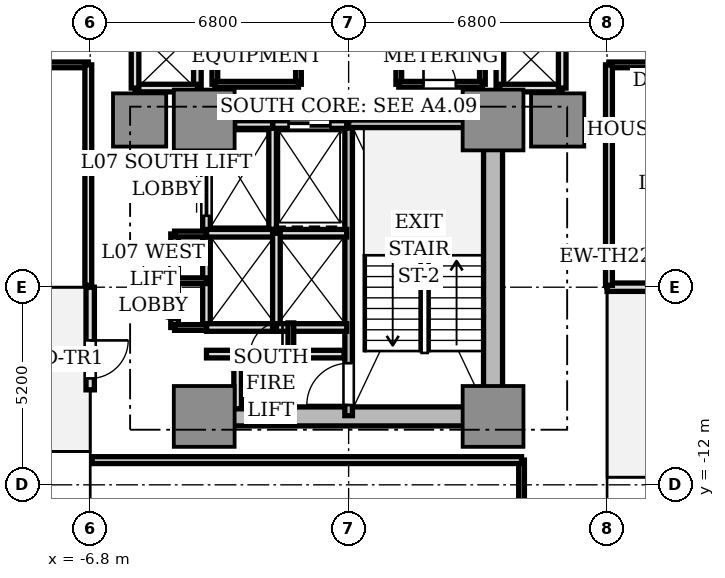
"""IFC4 building model, lengths in metres.
Left out: names, types, materials, properties, quantities, classifications, styles, units other than length and angle.
Written with IfcOpenShell. Run it as: python <this file> out.ifc"""

import sys

from ifc_helpers import new_model, si_unit, direction, frame, frame_2d, origin, origin_2d, place, context, subcontext, project, spatial, rectangle, extrude, source, transform, mapped, element, fill, save


model = new_model("IFC4")
c1 = context("Model", 3, precision=1e-05, world=origin(), true_north=direction((0.0, 1.0)))
c2 = subcontext(c1, "Body", "Model", "MODEL_VIEW")
j1 = project(units=[si_unit("LENGTHUNIT", "METRE"), si_unit("PLANEANGLEUNIT", "RADIAN")], contexts=[c1])
p1 = place(None, origin())
s1 = spatial("IfcSite", under=j1, at=p1, CompositionType="ELEMENT")
p2 = place(p1, origin())
s2 = spatial("IfcBuilding", under=s1, at=p2, CompositionType="ELEMENT")
p3 = place(p2, frame((0.0, 0.0, 29.8)))
s3 = spatial("IfcBuildingStorey", under=s2, at=p3, CompositionType="ELEMENT", Elevation=29.8)
p4 = place(p3, frame((-3.55, -10.2, 0.0), z_axis=(0.0, 0.0, 1.0), x_axis=(1.0, 0.0, 0.0)))
e1 = element("IfcWall", 1, at=p4, inside=s3, PredefinedType="SHEAR", context=c2, shape_type="SweptSolid", body=[
    extrude(rectangle(XDim=7.1, YDim=0.5, at=frame_2d((3.55, 0.0))), origin(), (0.0, 0.0, 1.0), 3.11),
])
p5 = place(p3, frame((3.8, -9.75, 0.0), z_axis=(0.0, 0.0, 1.0), x_axis=(0.0, 1.0, 0.0)))
e2 = element("IfcWall", 2, at=p5, inside=s3, PredefinedType="SHEAR", context=c2, shape_type="SweptSolid", body=[
    extrude(rectangle(XDim=6.9, YDim=0.5, at=frame_2d((3.45, 0.0))), origin(), (0.0, 0.0, 1.0), 3.11),
])
m1 = source(origin(), c2, "Body", "SweptSolid", [
    extrude(rectangle(XDim=1.6, YDim=1.6, at=origin_2d()), origin(), (0.0, 0.0, 1.0), 3.11),
])
for number, where, z_axis, x_axis in (
    (3, (-3.8, -2.4, 0.0), (0.0, 0.0, 1.0), (1.0, 0.0, 0.0)),
    (4, (3.8, -2.4, 0.0), (0.0, 0.0, 1.0), (1.0, 0.0, 0.0)),
    (5, (-3.8, -10.2, 0.0), (0.0, 0.0, 1.0), (1.0, 0.0, 0.0)),
    (6, (3.8, -10.2, 0.0), (0.0, 0.0, 1.0), (1.0, 0.0, 0.0)),
):
    element("IfcColumn", number, at=place(p3, frame(where, z_axis=z_axis, x_axis=x_axis)), inside=s3, PredefinedType="COLUMN", context=c2, shape_type="MappedRepresentation", body=[
        mapped(m1, transform((0.0, 0.0, 0.0), scale=1.0)),
    ])
m2 = source(origin(), c2, "Body", "SweptSolid", [
    extrude(rectangle(XDim=1.4, YDim=1.4, at=origin_2d()), origin(), (0.0, 0.0, 1.0), 3.11),
])
for number, where, z_axis, x_axis in (
    (7, (5.5, -2.4, 0.0), (0.0, 0.0, 1.0), (1.0, 0.0, 0.0)),
    (8, (-5.5, -2.4, 0.0), (0.0, 0.0, 1.0), (1.0, 0.0, 0.0)),
):
    element("IfcColumn", number, at=place(p3, frame(where, z_axis=z_axis, x_axis=x_axis)), inside=s3, PredefinedType="COLUMN", context=c2, shape_type="MappedRepresentation", body=[
        mapped(m2, transform((0.0, 0.0, 0.0), scale=1.0)),
    ])
p6 = place(p3, frame((6.8, -6.8, 0.0), z_axis=(0.0, 0.0, 1.0), x_axis=(1.0, 0.0, 0.0)))
e9 = element("IfcWall", 9, at=p6, inside=s3, PredefinedType="STANDARD", context=c2, shape_type="SweptSolid", body=[
    extrude(rectangle(XDim=2.7, YDim=0.22, at=frame_2d((1.35, 0.0))), origin(), (0.0, 0.0, 1.0), 3.11),
])
p7 = place(p6, frame((1.4, 0.0, 0.0)))
e10 = element("IfcOpeningElement", 10, at=p7, cuts=e9, PredefinedType="OPENING", context=c2, shape_type="SweptSolid", body=[
    extrude(rectangle(XDim=1.0, YDim=2.2, at=frame_2d((0.5, 1.1))), frame((0.0, 0.12, 0.0), z_axis=(0.0, -1.0, 0.0), x_axis=(1.0, 0.0, 0.0)), (0.0, 0.0, 1.0), 0.24),
])
p8 = place(p3, frame((-6.8, -6.8, 0.0), z_axis=(0.0, 0.0, 1.0), x_axis=(0.0, -1.0, 0.0)))
e11 = element("IfcWall", 11, at=p8, inside=s3, PredefinedType="STANDARD", context=c2, shape_type="SweptSolid", body=[
    extrude(rectangle(XDim=2.7, YDim=0.22, at=frame_2d((1.35, 0.0))), origin(), (0.0, 0.0, 1.0), 3.11),
])
p9 = place(p8, frame((1.4, 0.0, 0.0)))
e12 = element("IfcOpeningElement", 12, at=p9, cuts=e11, PredefinedType="OPENING", context=c2, shape_type="SweptSolid", body=[
    extrude(rectangle(XDim=1.0, YDim=2.2, at=frame_2d((0.5, 1.1))), frame((0.0, 0.12, 0.0), z_axis=(0.0, -1.0, 0.0), x_axis=(1.0, 0.0, 0.0)), (0.0, 0.0, 1.0), 0.24),
])
p10 = place(p3, frame((0.0, -10.18, 0.0), z_axis=(0.0, 0.0, 1.0), x_axis=(0.0, 1.0, 0.0)))
e13 = element("IfcWall", 13, at=p10, inside=s3, PredefinedType="SOLIDWALL", context=c2, shape_type="SweptSolid", body=[
    extrude(rectangle(XDim=7.68, YDim=0.2, at=frame_2d((3.84, 0.0))), origin(), (0.0, 0.0, 1.0), 3.11),
])
p11 = place(p10, frame((0.28, 0.0, 0.0)))
e14 = element("IfcOpeningElement", 14, at=p11, cuts=e13, PredefinedType="OPENING", context=c2, shape_type="SweptSolid", body=[
    extrude(rectangle(XDim=1.1, YDim=2.15, at=frame_2d((0.55, 1.075))), frame((0.0, 0.11, 0.0), z_axis=(0.0, -1.0, 0.0), x_axis=(1.0, 0.0, 0.0)), (0.0, 0.0, 1.0), 0.22),
])
p12 = place(p3, frame((0.0, -2.5, 0.0), z_axis=(0.0, 0.0, 1.0), x_axis=(1.0, 0.0, 0.0)))
e15 = element("IfcWall", 15, at=p12, inside=s3, PredefinedType="SOLIDWALL", context=c2, shape_type="SweptSolid", body=[
    extrude(rectangle(XDim=3.72, YDim=0.2, at=frame_2d((1.86, 0.0))), origin(), (0.0, 0.0, 1.0), 3.11),
])
p13 = place(p3, frame((-2.0, -5.28, 0.0), z_axis=(0.0, 0.0, 1.0), x_axis=(0.0, 1.0, 0.0)))
e16 = element("IfcWall", 16, at=p13, inside=s3, PredefinedType="SOLIDWALL", context=c2, shape_type="SweptSolid", body=[
    extrude(rectangle(XDim=2.78, YDim=0.2, at=frame_2d((1.39, 0.0))), origin(), (0.0, 0.0, 1.0), 2.66),
])
p14 = place(p3, frame((-2.0, -2.52, 0.0), z_axis=(0.0, 0.0, 1.0), x_axis=(1.0, 0.0, 0.0)))
e17 = element("IfcWall", 17, at=p14, inside=s3, PredefinedType="SOLIDWALL", context=c2, shape_type="SweptSolid", body=[
    extrude(rectangle(XDim=1.95, YDim=0.2, at=frame_2d((0.975, 0.0))), origin(), (0.0, 0.0, 1.0), 2.66),
])
p15 = place(p14, frame((0.42, 0.0, 0.0)))
e18 = element("IfcOpeningElement", 18, at=p15, cuts=e17, PredefinedType="OPENING", context=c2, shape_type="SweptSolid", body=[
    extrude(rectangle(XDim=1.1, YDim=2.2, at=frame_2d((0.55, 1.1))), frame((0.0, 0.11, 0.0), z_axis=(0.0, -1.0, 0.0), x_axis=(1.0, 0.0, 0.0)), (0.0, 0.0, 1.0), 0.22),
])
p16 = place(p3, frame((-3.0, -2.52, 0.0), z_axis=(0.0, 0.0, 1.0), x_axis=(1.0, 0.0, 0.0)))
e19 = element("IfcWall", 19, at=p16, inside=s3, PredefinedType="SOLIDWALL", context=c2, shape_type="SweptSolid", body=[
    extrude(rectangle(XDim=1.0, YDim=0.2, at=frame_2d((0.5, 0.0))), origin(), (0.0, 0.0, 1.0), 2.66),
])
p17 = place(p3, frame((-3.74, -5.36, 0.0), z_axis=(0.0, 0.0, 1.0), x_axis=(0.0, 1.0, 0.0)))
e20 = element("IfcWall", 20, at=p17, inside=s3, PredefinedType="SOLIDWALL", context=c2, shape_type="SweptSolid", body=[
    extrude(rectangle(XDim=2.08, YDim=0.2, at=frame_2d((1.04, 0.0))), origin(), (0.0, 0.0, 1.0), 2.66),
])
p18 = place(p17, frame((0.44, 0.0, 0.0)))
e21 = element("IfcOpeningElement", 21, at=p18, cuts=e20, PredefinedType="OPENING", context=c2, shape_type="SweptSolid", body=[
    extrude(rectangle(XDim=1.2, YDim=2.2, at=frame_2d((0.6, 1.1))), frame((0.0, 0.11, 0.0), z_axis=(0.0, -1.0, 0.0), x_axis=(1.0, 0.0, 0.0)), (0.0, 0.0, 1.0), 0.22),
])
p19 = place(p3, frame((-3.74, -7.86, 0.0), z_axis=(0.0, 0.0, 1.0), x_axis=(0.0, 1.0, 0.0)))
e22 = element("IfcWall", 22, at=p19, inside=s3, PredefinedType="SOLIDWALL", context=c2, shape_type="SweptSolid", body=[
    extrude(rectangle(XDim=2.48, YDim=0.2, at=frame_2d((1.24, 0.0))), origin(), (0.0, 0.0, 1.0), 2.66),
])
p20 = place(p3, frame((-3.74, -7.86, 0.0), z_axis=(0.0, 0.0, 1.0), x_axis=(1.0, 0.0, 0.0)))
e23 = element("IfcWall", 23, at=p20, inside=s3, PredefinedType="SOLIDWALL", context=c2, shape_type="SweptSolid", body=[
    extrude(rectangle(XDim=1.84, YDim=0.2, at=frame_2d((0.92, 0.0))), origin(), (0.0, 0.0, 1.0), 2.66),
])
p21 = place(p3, frame((-3.74, -5.38, 0.0), z_axis=(0.0, 0.0, 1.0), x_axis=(1.0, 0.0, 0.0)))
e24 = element("IfcWall", 24, at=p21, inside=s3, PredefinedType="SOLIDWALL", context=c2, shape_type="SweptSolid", body=[
    extrude(rectangle(XDim=3.69, YDim=0.2, at=frame_2d((1.845, 0.0))), origin(), (0.0, 0.0, 1.0), 2.66),
])
p22 = place(p3, frame((-1.9, -7.86, 0.0), z_axis=(0.0, 0.0, 1.0), x_axis=(0.0, 1.0, 0.0)))
e25 = element("IfcWall", 25, at=p22, inside=s3, PredefinedType="SOLIDWALL", context=c2, shape_type="SweptSolid", body=[
    extrude(rectangle(XDim=2.48, YDim=0.2, at=frame_2d((1.24, 0.0))), origin(), (0.0, 0.0, 1.0), 2.66),
])
p23 = place(p3, frame((-1.9, -7.86, 0.0), z_axis=(0.0, 0.0, 1.0), x_axis=(1.0, 0.0, 0.0)))
e26 = element("IfcWall", 26, at=p23, inside=s3, PredefinedType="SOLIDWALL", context=c2, shape_type="SweptSolid", body=[
    extrude(rectangle(XDim=1.85, YDim=0.2, at=frame_2d((0.925, 0.0))), origin(), (0.0, 0.0, 1.0), 2.66),
])
p24 = place(p3, frame((3.98, -1.56, 0.0), z_axis=(0.0, 0.0, 1.0), x_axis=(0.0, 1.0, 0.0)))
e27 = element("IfcWall", 27, at=p24, inside=s3, PredefinedType="SOLIDWALL", context=c2, shape_type="SweptSolid", body=[
    extrude(rectangle(XDim=3.12, YDim=0.2, at=frame_2d((1.56, 0.0))), origin(), (0.0, 0.0, 1.0), 2.18),
])
p25 = place(p3, frame((3.98, -1.56, 0.0), z_axis=(0.0, 0.0, 1.0), x_axis=(1.0, 0.0, 0.0)))
e28 = element("IfcWall", 28, at=p25, inside=s3, PredefinedType="SOLIDWALL", context=c2, shape_type="SweptSolid", body=[
    extrude(rectangle(XDim=1.64, YDim=0.2, at=frame_2d((0.82, 0.0))), origin(), (0.0, 0.0, 1.0), 2.66),
])
p26 = place(p3, frame((5.62, -1.56, 0.0), z_axis=(0.0, 0.0, 1.0), x_axis=(0.0, 1.0, 0.0)))
e29 = element("IfcWall", 29, at=p26, inside=s3, PredefinedType="SOLIDWALL", context=c2, shape_type="SweptSolid", body=[
    extrude(rectangle(XDim=1.56, YDim=0.2, at=frame_2d((0.78, 0.0))), origin(), (0.0, 0.0, 1.0), 2.66),
])
p27 = place(p3, frame((-3.98, -1.56, 0.0), z_axis=(0.0, 0.0, 1.0), x_axis=(0.0, 1.0, 0.0)))
e30 = element("IfcWall", 30, at=p27, inside=s3, PredefinedType="SOLIDWALL", context=c2, shape_type="SweptSolid", body=[
    extrude(rectangle(XDim=3.12, YDim=0.2, at=frame_2d((1.56, 0.0))), origin(), (0.0, 0.0, 1.0), 2.18),
])
p28 = place(p3, frame((-5.62, -1.56, 0.0), z_axis=(0.0, 0.0, 1.0), x_axis=(1.0, 0.0, 0.0)))
e31 = element("IfcWall", 31, at=p28, inside=s3, PredefinedType="SOLIDWALL", context=c2, shape_type="SweptSolid", body=[
    extrude(rectangle(XDim=1.64, YDim=0.2, at=frame_2d((0.82, 0.0))), origin(), (0.0, 0.0, 1.0), 2.66),
])
p29 = place(p3, frame((-5.62, -1.56, 0.0), z_axis=(0.0, 0.0, 1.0), x_axis=(0.0, 1.0, 0.0)))
e32 = element("IfcWall", 32, at=p29, inside=s3, PredefinedType="SOLIDWALL", context=c2, shape_type="SweptSolid", body=[
    extrude(rectangle(XDim=1.56, YDim=0.2, at=frame_2d((0.78, 0.0))), origin(), (0.0, 0.0, 1.0), 2.66),
])
p30 = place(p3, frame((-3.74, -8.56, 0.0), z_axis=(0.0, 0.0, 1.0), x_axis=(1.0, 0.0, 0.0)))
e33 = element("IfcWall", 33, at=p30, inside=s3, PredefinedType="SOLIDWALL", context=c2, shape_type="SweptSolid", body=[
    extrude(rectangle(XDim=3.62, YDim=0.2, at=frame_2d((1.81, 0.0))), origin(), (0.0, 0.0, 1.0), 2.66),
])
p31 = place(p30, frame((1.15, 0.0, 0.0)))
e34 = element("IfcOpeningElement", 34, at=p31, cuts=e33, PredefinedType="OPENING", context=c2, shape_type="SweptSolid", body=[
    extrude(rectangle(XDim=0.85, YDim=2.1, at=frame_2d((0.425, 1.05))), frame((0.0, 0.11, 0.0), z_axis=(0.0, -1.0, 0.0), x_axis=(1.0, 0.0, 0.0)), (0.0, 0.0, 1.0), 0.22),
])
p32 = place(p3, frame((-2.92, -10.0, 0.0), z_axis=(0.0, 0.0, 1.0), x_axis=(0.0, 1.0, 0.0)))
e35 = element("IfcWall", 35, at=p32, inside=s3, PredefinedType="SOLIDWALL", context=c2, shape_type="SweptSolid", body=[
    extrude(rectangle(XDim=1.44, YDim=0.2, at=frame_2d((0.72, 0.0))), origin(), (0.0, 0.0, 1.0), 2.66),
])
p33 = place(p3, frame((-1.52, -8.56, 0.0), z_axis=(0.0, 0.0, 1.0), x_axis=(0.0, 1.0, 0.0)))
e36 = element("IfcWall", 36, at=p33, inside=s3, PredefinedType="PARTITIONING", context=c2, shape_type="SweptSolid", body=[
    extrude(rectangle(XDim=0.82, YDim=0.15, at=frame_2d((0.41, 0.0))), origin(), (0.0, 0.0, 1.0), 2.66),
])
p34 = place(p3, frame((-4.58, -7.86, 0.0), z_axis=(0.0, 0.0, 1.0), x_axis=(0.0, 1.0, 0.0)))
e37 = element("IfcWall", 37, at=p34, inside=s3, PredefinedType="SOLIDWALL", context=c2, shape_type="SweptSolid", body=[
    extrude(rectangle(XDim=2.46, YDim=0.2, at=frame_2d((1.23, 0.0))), origin(), (0.0, 0.0, 1.0), 2.66),
])
p35 = place(p34, frame((0.2, 0.0, 0.0)))
e38 = element("IfcOpeningElement", 38, at=p35, cuts=e37, PredefinedType="OPENING", context=c2, shape_type="SweptSolid", body=[
    extrude(rectangle(XDim=0.85, YDim=2.1, at=frame_2d((0.425, 1.05))), frame((0.0, 0.11, 0.0), z_axis=(0.0, -1.0, 0.0), x_axis=(1.0, 0.0, 0.0)), (0.0, 0.0, 1.0), 0.22),
])
p36 = place(p34, frame((1.38, 0.0, 0.0)))
e39 = element("IfcOpeningElement", 39, at=p36, cuts=e37, PredefinedType="OPENING", context=c2, shape_type="SweptSolid", body=[
    extrude(rectangle(XDim=0.85, YDim=2.1, at=frame_2d((0.425, 1.05))), frame((0.0, 0.11, 0.0), z_axis=(0.0, -1.0, 0.0), x_axis=(1.0, 0.0, 0.0)), (0.0, 0.0, 1.0), 0.22),
])
for number, where, z_axis, x_axis in (
    (40, (-4.58, -5.4, 0.0), (0.0, 0.0, 1.0), (1.0, 0.0, 0.0)),
    (41, (-4.58, -7.86, 0.0), (0.0, 0.0, 1.0), (1.0, 0.0, 0.0)),
    (42, (-4.58, -6.63, 0.0), (0.0, 0.0, 1.0), (1.0, 0.0, 0.0)),
):
    element("IfcWall", number, at=place(p3, frame(where, z_axis=z_axis, x_axis=x_axis)), inside=s3, PredefinedType="PARTITIONING", context=c2, shape_type="SweptSolid", body=[
        extrude(rectangle(XDim=0.84, YDim=0.15, at=frame_2d((0.42, 0.0))), origin(), (0.0, 0.0, 1.0), 2.66),
    ])
p37 = place(p3, frame((-1.32, -1.46, 0.0), z_axis=(0.0, 0.0, 1.0), x_axis=(0.0, 1.0, 0.0)))
e43 = element("IfcWall", 43, at=p37, inside=s3, PredefinedType="PARTITIONING", context=c2, shape_type="SweptSolid", body=[
    extrude(rectangle(XDim=2.92, YDim=0.15, at=frame_2d((1.46, 0.0))), origin(), (0.0, 0.0, 1.0), 2.66),
])
p38 = place(p3, frame((-3.52, -1.46, 0.0), z_axis=(0.0, 0.0, 1.0), x_axis=(0.0, 1.0, 0.0)))
e44 = element("IfcWall", 44, at=p38, inside=s3, PredefinedType="PARTITIONING", context=c2, shape_type="SweptSolid", body=[
    extrude(rectangle(XDim=2.92, YDim=0.15, at=frame_2d((1.46, 0.0))), origin(), (0.0, 0.0, 1.0), 2.18),
])
p39 = place(p3, frame((-3.52, -1.46, 0.0), z_axis=(0.0, 0.0, 1.0), x_axis=(1.0, 0.0, 0.0)))
e45 = element("IfcWall", 45, at=p39, inside=s3, PredefinedType="PARTITIONING", context=c2, shape_type="SweptSolid", body=[
    extrude(rectangle(XDim=2.2, YDim=0.15, at=frame_2d((1.1, 0.0))), origin(), (0.0, 0.0, 1.0), 2.66),
])
p40 = place(p3, frame((1.32, -1.46, 0.0), z_axis=(0.0, 0.0, 1.0), x_axis=(0.0, 1.0, 0.0)))
e46 = element("IfcWall", 46, at=p40, inside=s3, PredefinedType="PARTITIONING", context=c2, shape_type="SweptSolid", body=[
    extrude(rectangle(XDim=2.92, YDim=0.15, at=frame_2d((1.46, 0.0))), origin(), (0.0, 0.0, 1.0), 2.66),
])
p41 = place(p3, frame((3.52, -1.46, 0.0), z_axis=(0.0, 0.0, 1.0), x_axis=(0.0, 1.0, 0.0)))
e47 = element("IfcWall", 47, at=p41, inside=s3, PredefinedType="PARTITIONING", context=c2, shape_type="SweptSolid", body=[
    extrude(rectangle(XDim=2.92, YDim=0.15, at=frame_2d((1.46, 0.0))), origin(), (0.0, 0.0, 1.0), 2.18),
])
p42 = place(p3, frame((1.32, -1.46, 0.0), z_axis=(0.0, 0.0, 1.0), x_axis=(1.0, 0.0, 0.0)))
e48 = element("IfcWall", 48, at=p42, inside=s3, PredefinedType="PARTITIONING", context=c2, shape_type="SweptSolid", body=[
    extrude(rectangle(XDim=2.2, YDim=0.15, at=frame_2d((1.1, 0.0))), origin(), (0.0, 0.0, 1.0), 2.66),
])
p43 = place(p42, frame((0.65, 0.0, 0.0)))
e49 = element("IfcOpeningElement", 49, at=p43, cuts=e48, PredefinedType="OPENING", context=c2, shape_type="SweptSolid", body=[
    extrude(rectangle(XDim=0.85, YDim=2.1, at=frame_2d((0.425, 1.05))), frame((0.0, 0.085, 0.0), z_axis=(0.0, -1.0, 0.0), x_axis=(1.0, 0.0, 0.0)), (0.0, 0.0, 1.0), 0.17),
])
p44 = place(p3, frame((6.85, -0.95, 0.0), z_axis=(0.0, 0.0, 1.0), x_axis=(1.0, 0.0, 0.0)))
e50 = element("IfcWall", 50, at=p44, inside=s3, PredefinedType="PARTITIONING", context=c2, shape_type="SweptSolid", body=[
    extrude(rectangle(XDim=3.35, YDim=0.15, at=frame_2d((1.675, 0.0))), origin(), (0.0, 0.0, 1.0), 2.66),
])
p45 = place(p44, frame((1.2, 0.0, 0.0)))
e51 = element("IfcOpeningElement", 51, at=p45, cuts=e50, PredefinedType="OPENING", context=c2, shape_type="SweptSolid", body=[
    extrude(rectangle(XDim=0.85, YDim=2.1, at=frame_2d((0.425, 1.05))), frame((0.0, 0.085, 0.0), z_axis=(0.0, -1.0, 0.0), x_axis=(1.0, 0.0, 0.0)), (0.0, 0.0, 1.0), 0.17),
])
p46 = place(p3, frame((6.85, -6.75, 0.0), z_axis=(0.0, 0.0, 1.0), x_axis=(0.0, 1.0, 0.0)))
e52 = element("IfcWall", 52, at=p46, inside=s3, PredefinedType="PARTITIONING", context=c2, shape_type="SweptSolid", body=[
    extrude(rectangle(XDim=5.8, YDim=0.18, at=frame_2d((2.9, 0.0))), origin(), (0.0, 0.0, 1.0), 2.66),
])
p47 = place(p3, frame((-6.85, -0.95, 0.0), z_axis=(0.0, 0.0, 1.0), x_axis=(-1.0, 0.0, 0.0)))
e53 = element("IfcWall", 53, at=p47, inside=s3, PredefinedType="PARTITIONING", context=c2, shape_type="SweptSolid", body=[
    extrude(rectangle(XDim=17.9, YDim=0.15, at=frame_2d((8.95, 0.0))), origin(), (0.0, 0.0, 1.0), 2.66),
])
p48 = place(p47, frame((1.76, 0.0, 0.0)))
e54 = element("IfcOpeningElement", 54, at=p48, cuts=e53, PredefinedType="OPENING", context=c2, shape_type="SweptSolid", body=[
    extrude(rectangle(XDim=0.85, YDim=2.1, at=frame_2d((0.425, 1.05))), frame((0.0, 0.085, 0.0), z_axis=(0.0, -1.0, 0.0), x_axis=(1.0, 0.0, 0.0)), (0.0, 0.0, 1.0), 0.17),
])
p49 = place(p47, frame((10.562, 0.0, 0.0)))
e55 = element("IfcOpeningElement", 55, at=p49, cuts=e53, PredefinedType="OPENING", context=c2, shape_type="SweptSolid", body=[
    extrude(rectangle(XDim=0.85, YDim=2.1, at=frame_2d((0.425, 1.05))), frame((0.0, 0.085, 0.0), z_axis=(0.0, -1.0, 0.0), x_axis=(1.0, 0.0, 0.0)), (0.0, 0.0, 1.0), 0.17),
])
p50 = place(p3, frame((-6.85, -0.95, 0.0), z_axis=(0.0, 0.0, 1.0), x_axis=(0.0, -1.0, 0.0)))
e56 = element("IfcWall", 56, at=p50, inside=s3, PredefinedType="PARTITIONING", context=c2, shape_type="SweptSolid", body=[
    extrude(rectangle(XDim=5.8, YDim=0.18, at=frame_2d((2.9, 0.0))), origin(), (0.0, 0.0, 1.0), 2.66),
])
p51 = place(p3, frame((4.55, -11.35, 0.0), z_axis=(0.0, 0.0, 1.0), x_axis=(0.0, -1.0, 0.0)))
e57 = element("IfcWall", 57, at=p51, inside=s3, PredefinedType="PARTITIONING", context=c2, shape_type="SweptSolid", body=[
    extrude(rectangle(XDim=8.75, YDim=0.15, at=frame_2d((4.375, 0.0))), origin(), (0.0, 0.0, 1.0), 2.63),
])
p52 = place(p51, frame((1.538, 0.0, 0.0)))
e58 = element("IfcOpeningElement", 58, at=p52, cuts=e57, PredefinedType="OPENING", context=c2, shape_type="SweptSolid", body=[
    extrude(rectangle(XDim=0.85, YDim=2.1, at=frame_2d((0.425, 1.05))), frame((0.0, 0.085, 0.0), z_axis=(0.0, -1.0, 0.0), x_axis=(1.0, 0.0, 0.0)), (0.0, 0.0, 1.0), 0.17),
])
p53 = place(p51, frame((4.937, 0.0, 0.0)))
e59 = element("IfcOpeningElement", 59, at=p53, cuts=e57, PredefinedType="OPENING", context=c2, shape_type="SweptSolid", body=[
    extrude(rectangle(XDim=0.85, YDim=2.1, at=frame_2d((0.425, 1.05))), frame((0.0, 0.085, 0.0), z_axis=(0.0, -1.0, 0.0), x_axis=(1.0, 0.0, 0.0)), (0.0, 0.0, 1.0), 0.17),
])
p54 = place(p3, frame((-6.75, -11.35, 0.0), z_axis=(0.0, 0.0, 1.0), x_axis=(1.0, 0.0, 0.0)))
e60 = element("IfcWall", 60, at=p54, inside=s3, PredefinedType="PARTITIONING", context=c2, shape_type="SweptSolid", body=[
    extrude(rectangle(XDim=11.3, YDim=0.18, at=frame_2d((5.65, 0.0))), origin(), (0.0, 0.0, 1.0), 2.66),
])
m3 = source(origin(), c2, "Body", "SweptSolid", [
    extrude(rectangle(XDim=1.0, YDim=0.05, at=origin_2d()), origin(), (0.0, 0.0, 1.0), 2.2),
])
p55 = place(p9, frame((0.5, 0.0, 0.0)))
e61 = element("IfcDoor", 61, at=p55, inside=s3, OperationType="SINGLE_SWING_LEFT", PredefinedType="DOOR", context=c2, shape_type="MappedRepresentation", body=[
    mapped(m3, transform((0.0, 0.0, 0.0), scale=1.0)),
])
fill(e12, e61)
m4 = source(origin(), c2, "Body", "SweptSolid", [
    extrude(rectangle(XDim=1.1, YDim=0.05, at=origin_2d()), origin(), (0.0, 0.0, 1.0), 2.2),
])
p56 = place(p15, frame((0.55, 0.0, 0.0)))
e62 = element("IfcDoor", 62, at=p56, inside=s3, OperationType="DOUBLE_DOOR_SLIDING", PredefinedType="DOOR", context=c2, shape_type="MappedRepresentation", body=[
    mapped(m4, transform((0.0, 0.0, 0.0), scale=1.0)),
])
fill(e18, e62)
m5 = source(origin(), c2, "Body", "SweptSolid", [
    extrude(rectangle(XDim=1.2, YDim=0.05, at=origin_2d()), origin(), (0.0, 0.0, 1.0), 2.2),
])
p57 = place(p18, frame((0.6, 0.0, 0.0)))
e63 = element("IfcDoor", 63, at=p57, inside=s3, OperationType="DOUBLE_DOOR_SLIDING", PredefinedType="DOOR", context=c2, shape_type="MappedRepresentation", body=[
    mapped(m5, transform((0.0, 0.0, 0.0), scale=1.0)),
])
fill(e21, e63)
m6 = source(origin(), c2, "Body", "SweptSolid", [
    extrude(rectangle(XDim=1.1, YDim=0.05, at=origin_2d()), origin(), (0.0, 0.0, 1.0), 2.15),
])
p58 = place(p11, frame((0.55, 0.0, 0.0)))
e64 = element("IfcDoor", 64, at=p58, inside=s3, OperationType="SINGLE_SWING_LEFT", PredefinedType="DOOR", context=c2, shape_type="MappedRepresentation", body=[
    mapped(m6, transform((0.0, 0.0, 0.0), scale=1.0)),
])
fill(e14, e64)
m7 = source(origin(), c2, "Body", "SweptSolid", [
    extrude(rectangle(XDim=0.85, YDim=0.05, at=origin_2d()), origin(), (0.0, 0.0, 1.0), 2.1),
])
p59 = place(p31, frame((0.425, 0.0, 0.0)))
e65 = element("IfcDoor", 65, at=p59, inside=s3, OperationType="SINGLE_SWING_RIGHT", PredefinedType="DOOR", context=c2, shape_type="MappedRepresentation", body=[
    mapped(m7, transform((0.0, 0.0, 0.0), scale=1.0)),
])
fill(e34, e65)
p60 = place(p35, frame((0.425, 0.0, 0.0)))
e66 = element("IfcDoor", 66, at=p60, inside=s3, OperationType="SINGLE_SWING_RIGHT", PredefinedType="DOOR", context=c2, shape_type="MappedRepresentation", body=[
    mapped(m7, transform((0.0, 0.0, 0.0), scale=1.0)),
])
fill(e38, e66)
p61 = place(p36, frame((0.425, 0.0, 0.0)))
e67 = element("IfcDoor", 67, at=p61, inside=s3, OperationType="SINGLE_SWING_LEFT", PredefinedType="DOOR", context=c2, shape_type="MappedRepresentation", body=[
    mapped(m7, transform((0.0, 0.0, 0.0), scale=1.0)),
])
fill(e39, e67)
p62 = place(p43, frame((0.425, 0.0, 0.0)))
e68 = element("IfcDoor", 68, at=p62, inside=s3, OperationType="SINGLE_SWING_LEFT", PredefinedType="DOOR", context=c2, shape_type="MappedRepresentation", body=[
    mapped(m7, transform((0.0, 0.0, 0.0), scale=1.0)),
])
fill(e49, e68)
save(model, sys.argv[1])
